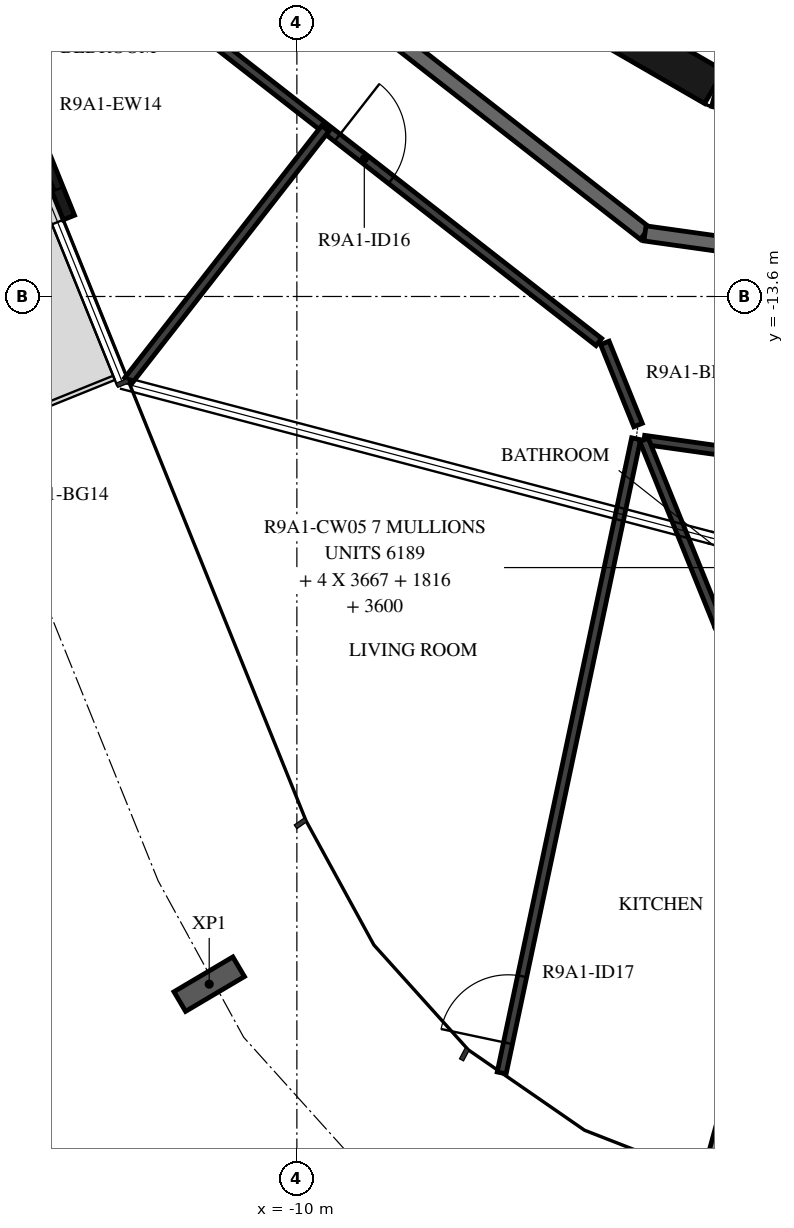
"""IFC4 building model, lengths in metres.
Left out: names, types, materials, properties, quantities, classifications, styles, units other than length and angle.
Written with IfcOpenShell. Run it as: python <this file> out.ifc"""

import sys

from ifc_helpers import new_model, si_unit, direction, frame, frame_2d, origin, origin_2d, place, context, subcontext, project, spatial, rectangle, i_section, extrude, element, fill, save


model = new_model("IFC4")
c1 = context("Model", 3, precision=1e-05, world=origin(), true_north=direction((0.0, 1.0)))
c2 = subcontext(c1, "Body", "Model", "MODEL_VIEW")
j1 = project(units=[si_unit("LENGTHUNIT", "METRE"), si_unit("PLANEANGLEUNIT", "RADIAN")], contexts=[c1])
p1 = place(None, origin())
s1 = spatial("IfcSite", under=j1, at=p1, CompositionType="ELEMENT")
p2 = place(p1, origin())
s2 = spatial("IfcBuilding", under=s1, at=p2, CompositionType="ELEMENT")
p3 = place(p2, frame((0.0, 0.0, 336.5)))
s3 = spatial("IfcBuildingStorey", under=s2, at=p3, CompositionType="ELEMENT", Elevation=336.5)
p4 = place(p3, frame((-11.153, -22.647, -0.38), z_axis=(0.0, 0.0, 1.0), x_axis=(-0.509114042361, 0.86069907161, 0.0)))
e1 = element("IfcColumn", 1, at=p4, inside=s3, PredefinedType="COLUMN", context=c2, shape_type="SweptSolid", body=[
    extrude(i_section(OverallWidth=0.3, OverallDepth=0.9, WebThickness=0.019, FlangeThickness=0.035, FilletRadius=0.03, at=origin_2d()), origin(), (0.0, 0.0, 1.0), 3.5),
])
p5 = place(p3, frame((-14.198, -9.594, 0.0), z_axis=(0.0, 0.0, 1.0), x_axis=(0.374624519695, -0.927176611678, 0.0)))
e2 = element("IfcWall", 2, at=p5, inside=s3, PredefinedType="STANDARD", context=c2, shape_type="SweptSolid", body=[
    extrude(rectangle(XDim=3.2, YDim=0.16, at=frame_2d((1.6, 0.0))), origin(), (0.0, 0.0, 1.0), 3.12),
])
p6 = place(p5, frame((0.4, 0.0, 0.0)))
e3 = element("IfcOpeningElement", 3, at=p6, cuts=e2, PredefinedType="OPENING", context=c2, shape_type="SweptSolid", body=[
    extrude(rectangle(XDim=2.4, YDim=2.4, at=frame_2d((1.2, 1.2))), frame((0.0, 0.09, 0.0), z_axis=(0.0, -1.0, 0.0), x_axis=(1.0, 0.0, 0.0)), (0.0, 0.0, 1.0), 0.18),
])
for number, where, z_axis, x_axis in (
    (4, (-7.137, -9.329, 0.0), (0.0, 0.0, 1.0), (0.866, -0.5, 0.0)),
    (5, (-4.479, -10.858, 0.0), (0.0, 0.0, 1.0), (0.966, -0.259, 0.0)),
):
    element("IfcWall", number, at=place(p3, frame(where, z_axis=z_axis, x_axis=x_axis)), inside=s3, PredefinedType="SHEAR", context=c2, shape_type="SweptSolid", body=[
        extrude(rectangle(XDim=3.033, YDim=0.5, at=frame_2d((1.516, 0.0))), origin(), (0.0, 0.0, 1.0), 3.12),
    ])
p7 = place(p3, frame((-11.079, -8.349, 0.0), z_axis=(0.0, 0.0, 1.0), x_axis=(0.78800478687, -0.615669112324, 0.0)))
e6 = element("IfcWall", 6, at=p7, inside=s3, PredefinedType="STANDARD", context=c2, shape_type="SweptSolid", body=[
    extrude(rectangle(XDim=7.181, YDim=0.2, at=frame_2d((3.591, 0.0))), origin(), (0.0, 0.0, 1.0), 3.12),
])
p8 = place(p3, frame((-5.42, -12.77, 0.0), z_axis=(0.0, 0.0, 1.0), x_axis=(0.990270565508, -0.139155334385, 0.0)))
e7 = element("IfcWall", 7, at=p8, inside=s3, PredefinedType="STANDARD", context=c2, shape_type="SweptSolid", body=[
    extrude(rectangle(XDim=7.181, YDim=0.2, at=frame_2d((3.59, 0.0))), origin(), (0.0, 0.0, 1.0), 3.12),
])
p9 = place(p8, frame((2.39, 0.0, 0.0)))
e8 = element("IfcOpeningElement", 8, at=p9, cuts=e7, PredefinedType="OPENING", context=c2, shape_type="SweptSolid", body=[
    extrude(rectangle(XDim=1.0, YDim=2.1, at=frame_2d((0.5, 1.05))), frame((0.0, 0.11, 0.0), z_axis=(0.0, -1.0, 0.0), x_axis=(1.0, 0.0, 0.0)), (0.0, 0.0, 1.0), 0.22),
])
p10 = place(p8, frame((4.091, 0.0, 0.0)))
e9 = element("IfcOpeningElement", 9, at=p10, cuts=e7, PredefinedType="OPENING", context=c2, shape_type="SweptSolid", body=[
    extrude(rectangle(XDim=1.0, YDim=2.1, at=frame_2d((0.5, 1.05))), frame((0.0, 0.11, 0.0), z_axis=(0.0, -1.0, 0.0), x_axis=(1.0, 0.0, 0.0)), (0.0, 0.0, 1.0), 0.22),
])
p11 = place(p3, frame((-4.574, -25.21, 0.0), z_axis=(0.0, 0.0, 1.0), x_axis=(0.264579024648, 0.964364007892, 0.0)))
e10 = element("IfcWall", 10, at=p11, inside=s3, PredefinedType="STANDARD", context=c2, shape_type="SweptSolid", body=[
    extrude(rectangle(XDim=6.486, YDim=0.2, at=frame_2d((3.243, 0.0))), origin(), (0.0, 0.0, 1.0), 2.73),
])
p12 = place(p3, frame((-12.319, -9.283, 0.0), z_axis=(0.0, 0.0, 1.0), x_axis=(0.788000268464, -0.61567489546, 0.0)))
e11 = element("IfcWall", 11, at=p12, inside=s3, PredefinedType="PARTITIONING", context=c2, shape_type="SweptSolid", body=[
    extrude(rectangle(XDim=7.985, YDim=0.12, at=frame_2d((3.992, 0.0))), origin(), (0.0, 0.0, 1.0), 3.12),
])
p13 = place(p12, frame((3.619, 0.0, 0.0)))
e12 = element("IfcOpeningElement", 12, at=p13, cuts=e11, PredefinedType="OPENING", context=c2, shape_type="SweptSolid", body=[
    extrude(rectangle(XDim=0.9, YDim=2.1, at=frame_2d((0.45, 1.05))), frame((0.0, 0.07, 0.0), z_axis=(0.0, -1.0, 0.0), x_axis=(1.0, 0.0, 0.0)), (0.0, 0.0, 1.0), 0.14),
])
p14 = place(p3, frame((-5.948, -14.21, 0.0), z_axis=(0.0, 0.0, 1.0), x_axis=(0.374601530156, -0.927185900241, 0.0)))
e13 = element("IfcWall", 13, at=p14, inside=s3, PredefinedType="PARTITIONING", context=c2, shape_type="SweptSolid", body=[
    extrude(rectangle(XDim=1.166, YDim=0.12, at=frame_2d((0.583, 0.0))), origin(), (0.0, 0.0, 1.0), 3.12),
])
p15 = place(p3, frame((-5.433, -15.487, 0.0), z_axis=(0.0, 0.0, 1.0), x_axis=(0.990268451053, -0.139170380644, 0.0)))
e14 = element("IfcWall", 14, at=p15, inside=s3, PredefinedType="PARTITIONING", context=c2, shape_type="SweptSolid", body=[
    extrude(rectangle(XDim=1.595, YDim=0.12, at=frame_2d((0.797, 0.0))), origin(), (0.0, 0.0, 1.0), 3.12),
])
p16 = place(p3, frame((-12.219, -14.708, 0.0), z_axis=(0.0, 0.0, 1.0), x_axis=(0.615656413137, 0.788014708596, 0.0)))
e15 = element("IfcWall", 15, at=p16, inside=s3, PredefinedType="PARTITIONING", context=c2, shape_type="SweptSolid", body=[
    extrude(rectangle(XDim=4.213, YDim=0.12, at=frame_2d((2.106, 0.0))), origin(), (0.0, 0.0, 1.0), 3.12),
])
p17 = place(p3, frame((-7.305, -23.815, 0.0), z_axis=(0.0, 0.0, 1.0), x_axis=(0.207366409306, 0.978263345062, 0.0)))
e16 = element("IfcWall", 16, at=p17, inside=s3, PredefinedType="PARTITIONING", context=c2, shape_type="SweptSolid", body=[
    extrude(rectangle(XDim=8.529, YDim=0.12, at=frame_2d((4.264, 0.0))), origin(), (0.0, 0.0, 1.0), 3.12),
])
p18 = place(p17, frame((0.4, 0.0, 0.0)))
e17 = element("IfcOpeningElement", 17, at=p18, cuts=e16, PredefinedType="OPENING", context=c2, shape_type="SweptSolid", body=[
    extrude(rectangle(XDim=0.9, YDim=2.1, at=frame_2d((0.45, 1.05))), frame((0.0, 0.07, 0.0), z_axis=(0.0, -1.0, 0.0), x_axis=(1.0, 0.0, 0.0)), (0.0, 0.0, 1.0), 0.14),
])
p19 = place(p3, frame((-4.445, -17.93, 0.0), z_axis=(0.0, 0.0, 1.0), x_axis=(-0.374614676827, 0.927180588616, 0.0)))
e18 = element("IfcWall", 18, at=p19, inside=s3, PredefinedType="PARTITIONING", context=c2, shape_type="SweptSolid", body=[
    extrude(rectangle(XDim=2.635, YDim=0.12, at=frame_2d((1.318, 0.0))), origin(), (0.0, 0.0, 1.0), 3.12),
])
p20 = place(p6, origin())
e19 = element("IfcDoor", 19, at=p20, inside=s3, OperationType="DOUBLE_DOOR_SLIDING", PredefinedType="DOOR", context=c2, shape_type="SweptSolid", body=[
    extrude(rectangle(XDim=2.4, YDim=2.4, at=frame_2d((1.2, 1.2))), frame((0.0, 0.025, 0.0), z_axis=(0.0, -1.0, 0.0), x_axis=(1.0, 0.0, 0.0)), (0.0, 0.0, 1.0), 0.05),
])
fill(e3, e19)
p21 = place(p13, origin())
e20 = element("IfcDoor", 20, at=p21, inside=s3, OperationType="SINGLE_SWING_RIGHT", PredefinedType="DOOR", context=c2, shape_type="SweptSolid", body=[
    extrude(rectangle(XDim=0.9, YDim=2.1, at=frame_2d((0.45, 1.05))), frame((0.0, 0.025, 0.0), z_axis=(0.0, -1.0, 0.0), x_axis=(1.0, 0.0, 0.0)), (0.0, 0.0, 1.0), 0.05),
])
fill(e12, e20)
p22 = place(p18, origin())
e21 = element("IfcDoor", 21, at=p22, inside=s3, OperationType="SINGLE_SWING_RIGHT", PredefinedType="DOOR", context=c2, shape_type="SweptSolid", body=[
    extrude(rectangle(XDim=0.9, YDim=2.1, at=frame_2d((0.45, 1.05))), frame((0.0, 0.025, 0.0), z_axis=(0.0, -1.0, 0.0), x_axis=(1.0, 0.0, 0.0)), (0.0, 0.0, 1.0), 0.05),
])
fill(e17, e21)
save(model, sys.argv[1])
